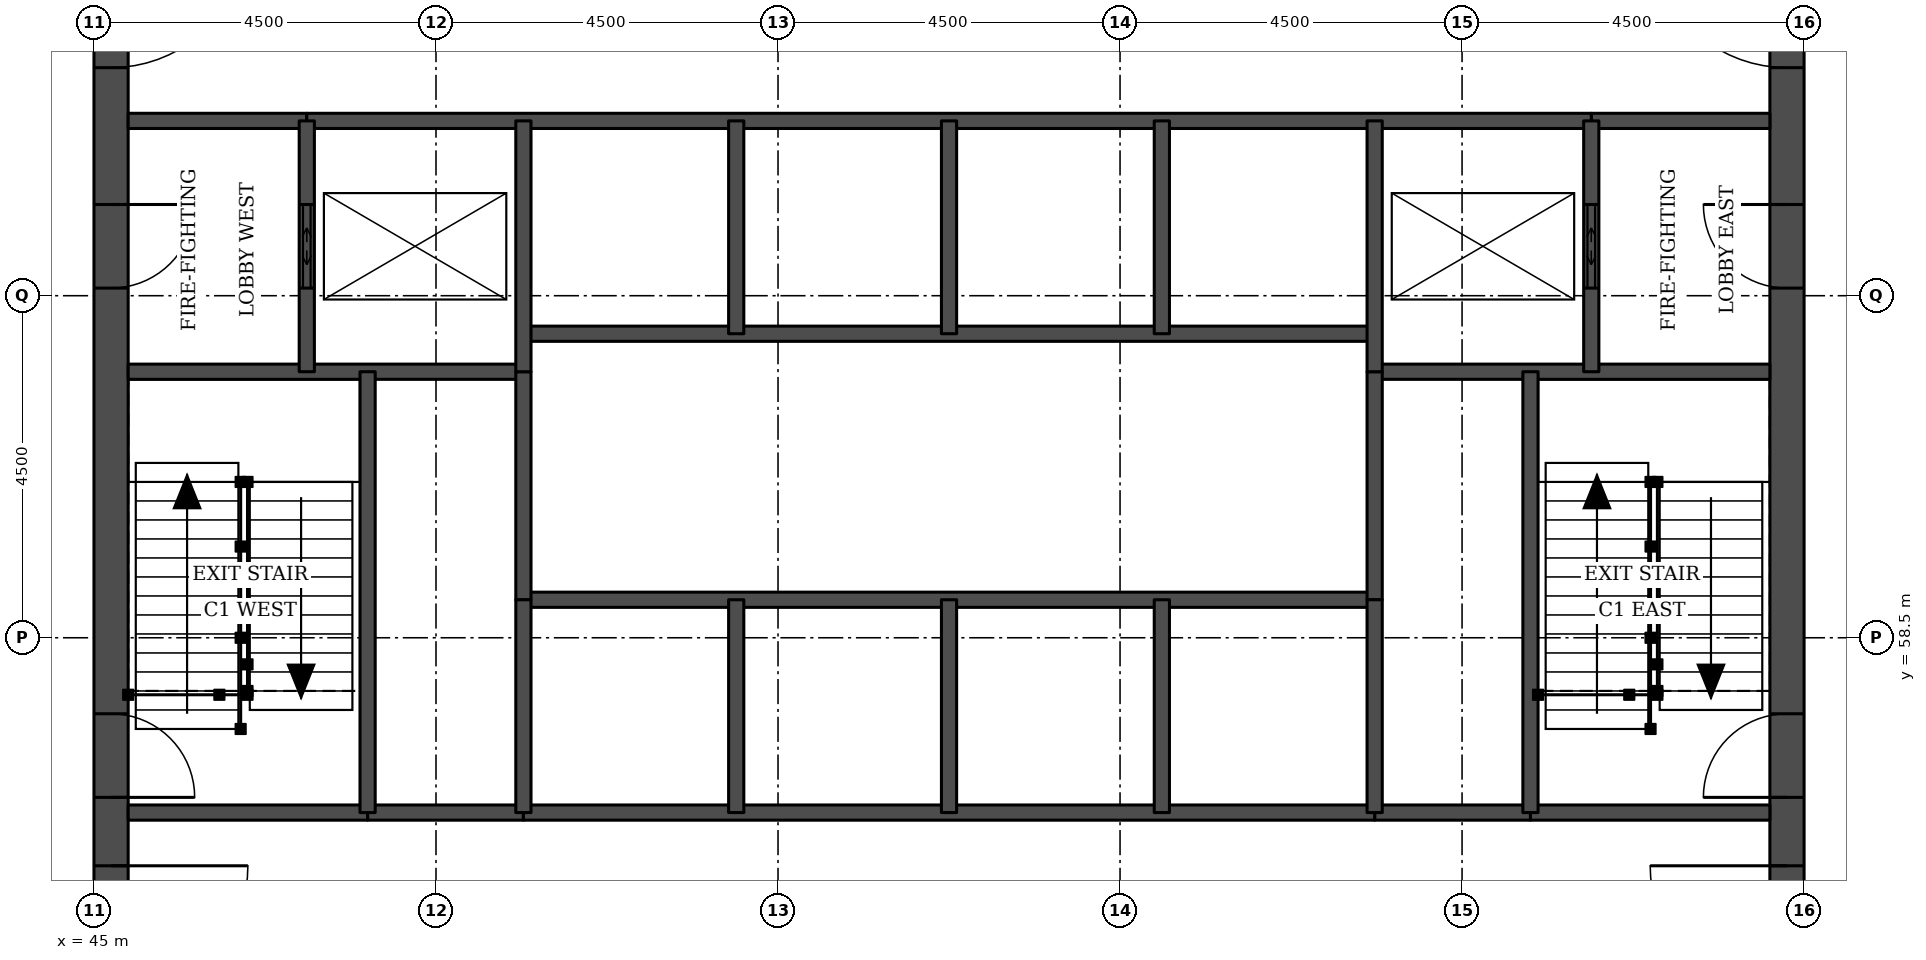
"""IFC4 building model, lengths in metres.
Left out: names, types, materials, properties, quantities, classifications, styles, units other than length and angle.
Written with IfcOpenShell. Run it as: python <this file> out.ifc"""

import sys

from ifc_helpers import new_model, si_unit, direction, frame, frame_2d, origin, place, context, subcontext, project, spatial, rectangle, extrude, element, fill, save


model = new_model("IFC4")
c1 = context("Model", 3, precision=1e-05, world=origin(), true_north=direction((0.0, 1.0)))
c2 = subcontext(c1, "Body", "Model", "MODEL_VIEW")
j1 = project(units=[si_unit("LENGTHUNIT", "METRE"), si_unit("PLANEANGLEUNIT", "RADIAN")], contexts=[c1])
p1 = place(None, origin())
s1 = spatial("IfcSite", under=j1, at=p1, CompositionType="ELEMENT")
p2 = place(p1, origin())
s2 = spatial("IfcBuilding", under=s1, at=p2, CompositionType="ELEMENT")
p3 = place(p2, frame((0.0, 0.0, 115.9)))
s3 = spatial("IfcBuildingStorey", under=s2, at=p3, CompositionType="ELEMENT", Elevation=115.9)
p4 = place(p3, frame((45.225, 49.5, 0.0), z_axis=(0.0, 0.0, 1.0), x_axis=(0.0, 1.0, 0.0)))
e1 = element("IfcWall", 1, at=p4, inside=s3, PredefinedType="SHEAR", context=c2, shape_type="SweptSolid", body=[
    extrude(rectangle(XDim=22.5, YDim=0.45, at=frame_2d((11.25, 0.0))), origin(), (0.0, 0.0, 1.0), 3.7),
])
p5 = place(p4, frame((4.2, 0.0, 0.0)))
e2 = element("IfcOpeningElement", 2, at=p5, cuts=e1, PredefinedType="OPENING", context=c2, shape_type="SweptSolid", body=[
    extrude(rectangle(XDim=1.8, YDim=2.1, at=frame_2d((0.9, 1.05))), frame((0.0, 0.235, 0.0), z_axis=(0.0, -1.0, 0.0), x_axis=(1.0, 0.0, 0.0)), (0.0, 0.0, 1.0), 0.47),
])
p6 = place(p4, frame((6.9, 0.0, 0.0)))
e3 = element("IfcOpeningElement", 3, at=p6, cuts=e1, PredefinedType="OPENING", context=c2, shape_type="SweptSolid", body=[
    extrude(rectangle(XDim=1.1, YDim=2.1, at=frame_2d((0.55, 1.05))), frame((0.0, 0.235, 0.0), z_axis=(0.0, -1.0, 0.0), x_axis=(1.0, 0.0, 0.0)), (0.0, 0.0, 1.0), 0.47),
])
p7 = place(p4, frame((13.6, 0.0, 0.0)))
e4 = element("IfcOpeningElement", 4, at=p7, cuts=e1, PredefinedType="OPENING", context=c2, shape_type="SweptSolid", body=[
    extrude(rectangle(XDim=1.1, YDim=2.1, at=frame_2d((0.55, 1.05))), frame((0.0, 0.235, 0.0), z_axis=(0.0, -1.0, 0.0), x_axis=(1.0, 0.0, 0.0)), (0.0, 0.0, 1.0), 0.47),
])
p8 = place(p4, frame((16.5, 0.0, 0.0)))
e5 = element("IfcOpeningElement", 5, at=p8, cuts=e1, PredefinedType="OPENING", context=c2, shape_type="SweptSolid", body=[
    extrude(rectangle(XDim=1.8, YDim=2.1, at=frame_2d((0.9, 1.05))), frame((0.0, 0.235, 0.0), z_axis=(0.0, -1.0, 0.0), x_axis=(1.0, 0.0, 0.0)), (0.0, 0.0, 1.0), 0.47),
])
p9 = place(p3, frame((67.275, 49.5, 0.0), z_axis=(0.0, 0.0, 1.0), x_axis=(0.0, 1.0, 0.0)))
e6 = element("IfcWall", 6, at=p9, inside=s3, PredefinedType="SHEAR", context=c2, shape_type="SweptSolid", body=[
    extrude(rectangle(XDim=22.5, YDim=0.45, at=frame_2d((11.25, 0.0))), origin(), (0.0, 0.0, 1.0), 3.7),
])
p10 = place(p9, frame((4.2, 0.0, 0.0)))
e7 = element("IfcOpeningElement", 7, at=p10, cuts=e6, PredefinedType="OPENING", context=c2, shape_type="SweptSolid", body=[
    extrude(rectangle(XDim=1.8, YDim=2.1, at=frame_2d((0.9, 1.05))), frame((0.0, 0.235, 0.0), z_axis=(0.0, -1.0, 0.0), x_axis=(1.0, 0.0, 0.0)), (0.0, 0.0, 1.0), 0.47),
])
p11 = place(p9, frame((6.9, 0.0, 0.0)))
e8 = element("IfcOpeningElement", 8, at=p11, cuts=e6, PredefinedType="OPENING", context=c2, shape_type="SweptSolid", body=[
    extrude(rectangle(XDim=1.1, YDim=2.1, at=frame_2d((0.55, 1.05))), frame((0.0, 0.235, 0.0), z_axis=(0.0, -1.0, 0.0), x_axis=(1.0, 0.0, 0.0)), (0.0, 0.0, 1.0), 0.47),
])
p12 = place(p9, frame((13.6, 0.0, 0.0)))
e9 = element("IfcOpeningElement", 9, at=p12, cuts=e6, PredefinedType="OPENING", context=c2, shape_type="SweptSolid", body=[
    extrude(rectangle(XDim=1.1, YDim=2.1, at=frame_2d((0.55, 1.05))), frame((0.0, 0.235, 0.0), z_axis=(0.0, -1.0, 0.0), x_axis=(1.0, 0.0, 0.0)), (0.0, 0.0, 1.0), 0.47),
])
p13 = place(p9, frame((16.5, 0.0, 0.0)))
e10 = element("IfcOpeningElement", 10, at=p13, cuts=e6, PredefinedType="OPENING", context=c2, shape_type="SweptSolid", body=[
    extrude(rectangle(XDim=1.8, YDim=2.1, at=frame_2d((0.9, 1.05))), frame((0.0, 0.235, 0.0), z_axis=(0.0, -1.0, 0.0), x_axis=(1.0, 0.0, 0.0)), (0.0, 0.0, 1.0), 0.47),
])
for number, where, z_axis, x_axis in (
    (11, (48.6, 56.2, 0.0), (0.0, 0.0, 1.0), (1.0, 0.0, 0.0)),
    (12, (61.85, 56.2, 0.0), (0.0, 0.0, 1.0), (1.0, 0.0, 0.0)),
):
    element("IfcWall", number, at=place(p3, frame(where, z_axis=z_axis, x_axis=x_axis)), inside=s3, PredefinedType="SOLIDWALL", context=c2, shape_type="SweptSolid", body=[
        extrude(rectangle(XDim=2.05, YDim=0.2, at=frame_2d((1.025, 0.0))), origin(), (0.0, 0.0, 1.0), 3.55),
    ])
p14 = place(p3, frame((45.45, 56.2, 0.0), z_axis=(0.0, 0.0, 1.0), x_axis=(1.0, 0.0, 0.0)))
e13 = element("IfcWall", 13, at=p14, inside=s3, PredefinedType="SOLIDWALL", context=c2, shape_type="SweptSolid", body=[
    extrude(rectangle(XDim=3.15, YDim=0.2, at=frame_2d((1.575, 0.0))), origin(), (0.0, 0.0, 1.0), 3.55),
])
p15 = place(p3, frame((50.65, 56.2, 0.0), z_axis=(0.0, 0.0, 1.0), x_axis=(1.0, 0.0, 0.0)))
e14 = element("IfcWall", 14, at=p15, inside=s3, PredefinedType="SOLIDWALL", context=c2, shape_type="SweptSolid", body=[
    extrude(rectangle(XDim=11.2, YDim=0.2, at=frame_2d((5.6, 0.0))), origin(), (0.0, 0.0, 1.0), 3.55),
])
p16 = place(p3, frame((63.9, 56.2, 0.0), z_axis=(0.0, 0.0, 1.0), x_axis=(1.0, 0.0, 0.0)))
e15 = element("IfcWall", 15, at=p16, inside=s3, PredefinedType="SOLIDWALL", context=c2, shape_type="SweptSolid", body=[
    extrude(rectangle(XDim=3.15, YDim=0.2, at=frame_2d((1.575, 0.0))), origin(), (0.0, 0.0, 1.0), 3.55),
])
p17 = place(p3, frame((50.65, 59.0, 0.0), z_axis=(0.0, 0.0, 1.0), x_axis=(1.0, 0.0, 0.0)))
e16 = element("IfcWall", 16, at=p17, inside=s3, PredefinedType="SOLIDWALL", context=c2, shape_type="SweptSolid", body=[
    extrude(rectangle(XDim=11.2, YDim=0.2, at=frame_2d((5.6, 0.0))), origin(), (0.0, 0.0, 1.0), 3.7),
])
for number, where, z_axis, x_axis in (
    (17, (45.45, 62.0, 0.0), (0.0, 0.0, 1.0), (1.0, 0.0, 0.0)),
    (18, (61.85, 62.0, 0.0), (0.0, 0.0, 1.0), (1.0, 0.0, 0.0)),
):
    element("IfcWall", number, at=place(p3, frame(where, z_axis=z_axis, x_axis=x_axis)), inside=s3, PredefinedType="SOLIDWALL", context=c2, shape_type="SweptSolid", body=[
        extrude(rectangle(XDim=5.2, YDim=0.2, at=frame_2d((2.6, 0.0))), origin(), (0.0, 0.0, 1.0), 3.55),
    ])
p18 = place(p3, frame((50.65, 62.5, 0.0), z_axis=(0.0, 0.0, 1.0), x_axis=(1.0, 0.0, 0.0)))
e19 = element("IfcWall", 19, at=p18, inside=s3, PredefinedType="SOLIDWALL", context=c2, shape_type="SweptSolid", body=[
    extrude(rectangle(XDim=11.2, YDim=0.2, at=frame_2d((5.6, 0.0))), origin(), (0.0, 0.0, 1.0), 3.7),
])
for number, where, z_axis, x_axis in (
    (20, (45.45, 65.3, 0.0), (0.0, 0.0, 1.0), (1.0, 0.0, 0.0)),
    (21, (64.7, 65.3, 0.0), (0.0, 0.0, 1.0), (1.0, 0.0, 0.0)),
):
    element("IfcWall", number, at=place(p3, frame(where, z_axis=z_axis, x_axis=x_axis)), inside=s3, PredefinedType="SOLIDWALL", context=c2, shape_type="SweptSolid", body=[
        extrude(rectangle(XDim=2.35, YDim=0.2, at=frame_2d((1.175, 0.0))), origin(), (0.0, 0.0, 1.0), 3.55),
    ])
p19 = place(p3, frame((47.8, 65.3, 0.0), z_axis=(0.0, 0.0, 1.0), x_axis=(1.0, 0.0, 0.0)))
e22 = element("IfcWall", 22, at=p19, inside=s3, PredefinedType="SOLIDWALL", context=c2, shape_type="SweptSolid", body=[
    extrude(rectangle(XDim=16.9, YDim=0.2, at=frame_2d((8.45, 0.0))), origin(), (0.0, 0.0, 1.0), 3.55),
])
p20 = place(p3, frame((47.8, 62.0, 0.0), z_axis=(0.0, 0.0, 1.0), x_axis=(0.0, 1.0, 0.0)))
e23 = element("IfcWall", 23, at=p20, inside=s3, PredefinedType="SOLIDWALL", context=c2, shape_type="SweptSolid", body=[
    extrude(rectangle(XDim=3.3, YDim=0.2, at=frame_2d((1.65, 0.0))), origin(), (0.0, 0.0, 1.0), 3.55),
])
p21 = place(p20, frame((1.1, 0.0, 0.0)))
e24 = element("IfcOpeningElement", 24, at=p21, cuts=e23, PredefinedType="OPENING", context=c2, shape_type="SweptSolid", body=[
    extrude(rectangle(XDim=1.1, YDim=2.1, at=frame_2d((0.55, 1.05))), frame((0.0, 0.11, 0.0), z_axis=(0.0, -1.0, 0.0), x_axis=(1.0, 0.0, 0.0)), (0.0, 0.0, 1.0), 0.22),
])
p22 = place(p3, frame((48.6, 56.2, 0.0), z_axis=(0.0, 0.0, 1.0), x_axis=(0.0, 1.0, 0.0)))
e25 = element("IfcWall", 25, at=p22, inside=s3, PredefinedType="SOLIDWALL", context=c2, shape_type="SweptSolid", body=[
    extrude(rectangle(XDim=5.8, YDim=0.2, at=frame_2d((2.9, 0.0))), origin(), (0.0, 0.0, 1.0), 3.55),
])
p23 = place(p3, frame((50.65, 59.0, 0.0), z_axis=(0.0, 0.0, 1.0), x_axis=(0.0, 1.0, 0.0)))
e26 = element("IfcWall", 26, at=p23, inside=s3, PredefinedType="SOLIDWALL", context=c2, shape_type="SweptSolid", body=[
    extrude(rectangle(XDim=3.0, YDim=0.2, at=frame_2d((1.5, 0.0))), origin(), (0.0, 0.0, 1.0), 3.7),
])
p24 = place(p3, frame((50.65, 56.2, 0.0), z_axis=(0.0, 0.0, 1.0), x_axis=(0.0, 1.0, 0.0)))
e27 = element("IfcWall", 27, at=p24, inside=s3, PredefinedType="SOLIDWALL", context=c2, shape_type="SweptSolid", body=[
    extrude(rectangle(XDim=2.8, YDim=0.2, at=frame_2d((1.4, 0.0))), origin(), (0.0, 0.0, 1.0), 3.55),
])
p25 = place(p3, frame((50.65, 62.0, 0.0), z_axis=(0.0, 0.0, 1.0), x_axis=(0.0, 1.0, 0.0)))
e28 = element("IfcWall", 28, at=p25, inside=s3, PredefinedType="SOLIDWALL", context=c2, shape_type="SweptSolid", body=[
    extrude(rectangle(XDim=3.3, YDim=0.2, at=frame_2d((1.65, 0.0))), origin(), (0.0, 0.0, 1.0), 3.55),
])
for number, where, z_axis, x_axis in (
    (29, (53.45, 56.2, 0.0), (0.0, 0.0, 1.0), (0.0, 1.0, 0.0)),
    (30, (53.45, 62.5, 0.0), (0.0, 0.0, 1.0), (0.0, 1.0, 0.0)),
    (31, (56.25, 56.2, 0.0), (0.0, 0.0, 1.0), (0.0, 1.0, 0.0)),
    (32, (56.25, 62.5, 0.0), (0.0, 0.0, 1.0), (0.0, 1.0, 0.0)),
    (33, (59.05, 56.2, 0.0), (0.0, 0.0, 1.0), (0.0, 1.0, 0.0)),
    (34, (59.05, 62.5, 0.0), (0.0, 0.0, 1.0), (0.0, 1.0, 0.0)),
):
    element("IfcWall", number, at=place(p3, frame(where, z_axis=z_axis, x_axis=x_axis)), inside=s3, PredefinedType="SOLIDWALL", context=c2, shape_type="SweptSolid", body=[
        extrude(rectangle(XDim=2.8, YDim=0.2, at=frame_2d((1.4, 0.0))), origin(), (0.0, 0.0, 1.0), 3.55),
    ])
p26 = place(p3, frame((61.85, 59.0, 0.0), z_axis=(0.0, 0.0, 1.0), x_axis=(0.0, 1.0, 0.0)))
e35 = element("IfcWall", 35, at=p26, inside=s3, PredefinedType="SOLIDWALL", context=c2, shape_type="SweptSolid", body=[
    extrude(rectangle(XDim=3.0, YDim=0.2, at=frame_2d((1.5, 0.0))), origin(), (0.0, 0.0, 1.0), 3.7),
])
p27 = place(p3, frame((61.85, 56.2, 0.0), z_axis=(0.0, 0.0, 1.0), x_axis=(0.0, 1.0, 0.0)))
e36 = element("IfcWall", 36, at=p27, inside=s3, PredefinedType="SOLIDWALL", context=c2, shape_type="SweptSolid", body=[
    extrude(rectangle(XDim=2.8, YDim=0.2, at=frame_2d((1.4, 0.0))), origin(), (0.0, 0.0, 1.0), 3.55),
])
p28 = place(p3, frame((61.85, 62.0, 0.0), z_axis=(0.0, 0.0, 1.0), x_axis=(0.0, 1.0, 0.0)))
e37 = element("IfcWall", 37, at=p28, inside=s3, PredefinedType="SOLIDWALL", context=c2, shape_type="SweptSolid", body=[
    extrude(rectangle(XDim=3.3, YDim=0.2, at=frame_2d((1.65, 0.0))), origin(), (0.0, 0.0, 1.0), 3.55),
])
p29 = place(p3, frame((63.9, 56.2, 0.0), z_axis=(0.0, 0.0, 1.0), x_axis=(0.0, 1.0, 0.0)))
e38 = element("IfcWall", 38, at=p29, inside=s3, PredefinedType="SOLIDWALL", context=c2, shape_type="SweptSolid", body=[
    extrude(rectangle(XDim=5.8, YDim=0.2, at=frame_2d((2.9, 0.0))), origin(), (0.0, 0.0, 1.0), 3.55),
])
p30 = place(p3, frame((64.7, 62.0, 0.0), z_axis=(0.0, 0.0, 1.0), x_axis=(0.0, 1.0, 0.0)))
e39 = element("IfcWall", 39, at=p30, inside=s3, PredefinedType="SOLIDWALL", context=c2, shape_type="SweptSolid", body=[
    extrude(rectangle(XDim=3.3, YDim=0.2, at=frame_2d((1.65, 0.0))), origin(), (0.0, 0.0, 1.0), 3.55),
])
p31 = place(p30, frame((1.1, 0.0, 0.0)))
e40 = element("IfcOpeningElement", 40, at=p31, cuts=e39, PredefinedType="OPENING", context=c2, shape_type="SweptSolid", body=[
    extrude(rectangle(XDim=1.1, YDim=2.1, at=frame_2d((0.55, 1.05))), frame((0.0, 0.11, 0.0), z_axis=(0.0, -1.0, 0.0), x_axis=(1.0, 0.0, 0.0)), (0.0, 0.0, 1.0), 0.22),
])
p32 = place(p21, origin())
e41 = element("IfcDoor", 41, at=p32, inside=s3, OperationType="DOUBLE_DOOR_SLIDING", PredefinedType="DOOR", context=c2, shape_type="SweptSolid", body=[
    extrude(rectangle(XDim=1.1, YDim=2.1, at=frame_2d((0.55, 1.05))), frame((0.0, 0.025, 0.0), z_axis=(0.0, -1.0, 0.0), x_axis=(1.0, 0.0, 0.0)), (0.0, 0.0, 1.0), 0.05),
])
fill(e24, e41)
p33 = place(p31, origin())
e42 = element("IfcDoor", 42, at=p33, inside=s3, OperationType="DOUBLE_DOOR_SLIDING", PredefinedType="DOOR", context=c2, shape_type="SweptSolid", body=[
    extrude(rectangle(XDim=1.1, YDim=2.1, at=frame_2d((0.55, 1.05))), frame((0.0, 0.025, 0.0), z_axis=(0.0, -1.0, 0.0), x_axis=(1.0, 0.0, 0.0)), (0.0, 0.0, 1.0), 0.05),
])
fill(e40, e42)
p34 = place(p5, frame((1.8, 0.0, 0.0), z_axis=(0.0, 0.0, 1.0), x_axis=(-1.0, 0.0, 0.0)))
e43 = element("IfcDoor", 43, at=p34, inside=s3, OperationType="SINGLE_SWING_LEFT", PredefinedType="DOOR", context=c2, shape_type="SweptSolid", body=[
    extrude(rectangle(XDim=1.8, YDim=2.1, at=frame_2d((0.9, 1.05))), frame((0.0, 0.025, 0.0), z_axis=(0.0, -1.0, 0.0), x_axis=(1.0, 0.0, 0.0)), (0.0, 0.0, 1.0), 0.05),
])
fill(e2, e43)
p35 = place(p6, frame((1.1, 0.0, 0.0), z_axis=(0.0, 0.0, 1.0), x_axis=(-1.0, 0.0, 0.0)))
e44 = element("IfcDoor", 44, at=p35, inside=s3, OperationType="SINGLE_SWING_RIGHT", PredefinedType="DOOR", context=c2, shape_type="SweptSolid", body=[
    extrude(rectangle(XDim=1.1, YDim=2.1, at=frame_2d((0.55, 1.05))), frame((0.0, 0.025, 0.0), z_axis=(0.0, -1.0, 0.0), x_axis=(1.0, 0.0, 0.0)), (0.0, 0.0, 1.0), 0.05),
])
fill(e3, e44)
p36 = place(p7, frame((1.1, 0.0, 0.0), z_axis=(0.0, 0.0, 1.0), x_axis=(-1.0, 0.0, 0.0)))
e45 = element("IfcDoor", 45, at=p36, inside=s3, OperationType="SINGLE_SWING_LEFT", PredefinedType="DOOR", context=c2, shape_type="SweptSolid", body=[
    extrude(rectangle(XDim=1.1, YDim=2.1, at=frame_2d((0.55, 1.05))), frame((0.0, 0.025, 0.0), z_axis=(0.0, -1.0, 0.0), x_axis=(1.0, 0.0, 0.0)), (0.0, 0.0, 1.0), 0.05),
])
fill(e4, e45)
p37 = place(p8, frame((1.8, 0.0, 0.0), z_axis=(0.0, 0.0, 1.0), x_axis=(-1.0, 0.0, 0.0)))
e46 = element("IfcDoor", 46, at=p37, inside=s3, OperationType="SINGLE_SWING_LEFT", PredefinedType="DOOR", context=c2, shape_type="SweptSolid", body=[
    extrude(rectangle(XDim=1.8, YDim=2.1, at=frame_2d((0.9, 1.05))), frame((0.0, 0.025, 0.0), z_axis=(0.0, -1.0, 0.0), x_axis=(1.0, 0.0, 0.0)), (0.0, 0.0, 1.0), 0.05),
])
fill(e5, e46)
p38 = place(p10, origin())
e47 = element("IfcDoor", 47, at=p38, inside=s3, OperationType="SINGLE_SWING_RIGHT", PredefinedType="DOOR", context=c2, shape_type="SweptSolid", body=[
    extrude(rectangle(XDim=1.8, YDim=2.1, at=frame_2d((0.9, 1.05))), frame((0.0, 0.025, 0.0), z_axis=(0.0, -1.0, 0.0), x_axis=(1.0, 0.0, 0.0)), (0.0, 0.0, 1.0), 0.05),
])
fill(e7, e47)
p39 = place(p11, origin())
e48 = element("IfcDoor", 48, at=p39, inside=s3, OperationType="SINGLE_SWING_LEFT", PredefinedType="DOOR", context=c2, shape_type="SweptSolid", body=[
    extrude(rectangle(XDim=1.1, YDim=2.1, at=frame_2d((0.55, 1.05))), frame((0.0, 0.025, 0.0), z_axis=(0.0, -1.0, 0.0), x_axis=(1.0, 0.0, 0.0)), (0.0, 0.0, 1.0), 0.05),
])
fill(e8, e48)
p40 = place(p12, origin())
e49 = element("IfcDoor", 49, at=p40, inside=s3, OperationType="SINGLE_SWING_RIGHT", PredefinedType="DOOR", context=c2, shape_type="SweptSolid", body=[
    extrude(rectangle(XDim=1.1, YDim=2.1, at=frame_2d((0.55, 1.05))), frame((0.0, 0.025, 0.0), z_axis=(0.0, -1.0, 0.0), x_axis=(1.0, 0.0, 0.0)), (0.0, 0.0, 1.0), 0.05),
])
fill(e9, e49)
p41 = place(p13, origin())
e50 = element("IfcDoor", 50, at=p41, inside=s3, OperationType="SINGLE_SWING_RIGHT", PredefinedType="DOOR", context=c2, shape_type="SweptSolid", body=[
    extrude(rectangle(XDim=1.8, YDim=2.1, at=frame_2d((0.9, 1.05))), frame((0.0, 0.025, 0.0), z_axis=(0.0, -1.0, 0.0), x_axis=(1.0, 0.0, 0.0)), (0.0, 0.0, 1.0), 0.05),
])
fill(e10, e50)
save(model, sys.argv[1])
